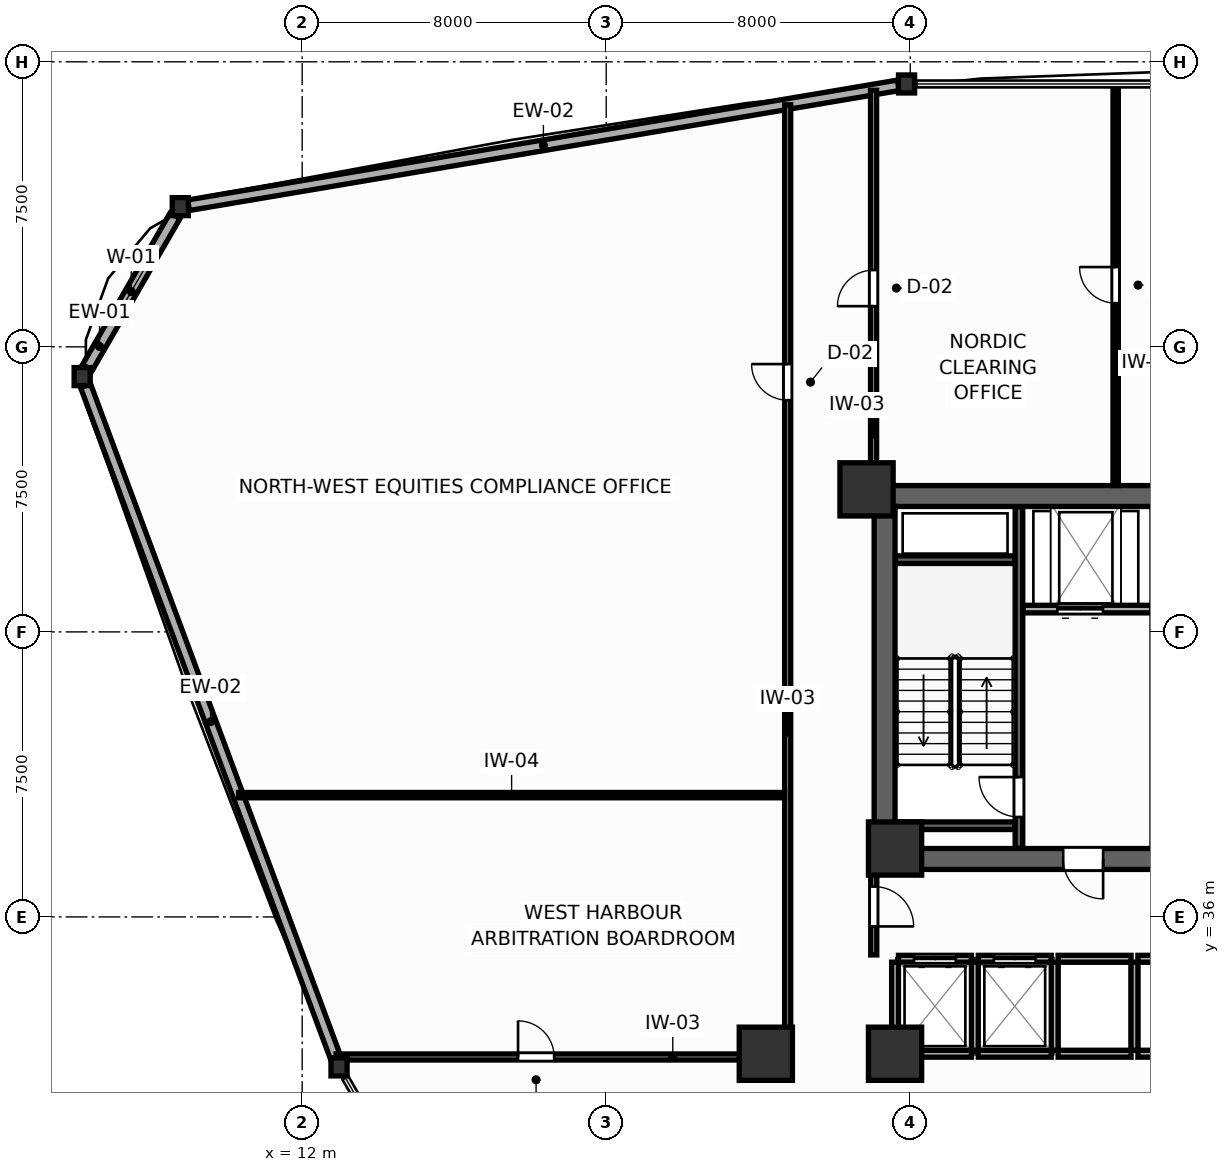
"""IFC4 building model, lengths in metres.
Left out: names, types, materials, properties, quantities, classifications, styles, units other than length and angle.
Written with IfcOpenShell. Run it as: python <this file> out.ifc"""

import sys

from ifc_helpers import new_model, si_unit, direction, frame, frame_2d, origin, origin_2d, place, context, subcontext, project, spatial, rectangle, i_section, extrude, source, transform, mapped, element, fill, save


model = new_model("IFC4")
c1 = context("Model", 3, precision=1e-05, world=origin(), true_north=direction((0.0, 1.0)))
c2 = subcontext(c1, "Body", "Model", "MODEL_VIEW")
j1 = project(units=[si_unit("LENGTHUNIT", "METRE"), si_unit("PLANEANGLEUNIT", "RADIAN")], contexts=[c1])
p1 = place(None, origin())
s1 = spatial("IfcSite", under=j1, at=p1, CompositionType="ELEMENT")
p2 = place(p1, origin())
s2 = spatial("IfcBuilding", under=s1, at=p2, CompositionType="ELEMENT")
p3 = place(p2, frame((0.0, 0.0, 27.9)))
s3 = spatial("IfcBuildingStorey", under=s2, at=p3, CompositionType="ELEMENT", Elevation=27.9)
p4 = place(p3, frame((27.05, 47.075, 0.0), z_axis=(0.0, 0.0, 1.0), x_axis=(1.0, 0.0, 0.0)))
e1 = element("IfcWall", 1, at=p4, inside=s3, PredefinedType="SHEAR", context=c2, shape_type="SweptSolid", body=[
    extrude(rectangle(XDim=17.9, YDim=0.55, at=frame_2d((8.95, 0.0))), origin(), (0.0, 0.0, 1.0), 3.9),
])
p5 = place(p3, frame((27.05, 37.525, 0.0), z_axis=(0.0, 0.0, 1.0), x_axis=(1.0, 0.0, 0.0)))
e2 = element("IfcWall", 2, at=p5, inside=s3, PredefinedType="SHEAR", context=c2, shape_type="SweptSolid", body=[
    extrude(rectangle(XDim=17.9, YDim=0.55, at=frame_2d((8.95, 0.0))), origin(), (0.0, 0.0, 1.0), 3.9),
])
p6 = place(p5, frame((4.975, 0.0, 0.0)))
e3 = element("IfcOpeningElement", 3, at=p6, cuts=e2, PredefinedType="OPENING", context=c2, shape_type="SweptSolid", body=[
    extrude(rectangle(XDim=1.05, YDim=2.1, at=frame_2d((0.525, 1.05))), frame((0.0, 0.285, 0.0), z_axis=(0.0, -1.0, 0.0), x_axis=(1.0, 0.0, 0.0)), (0.0, 0.0, 1.0), 0.57),
])
p7 = place(p5, frame((11.875, 0.0, 0.0)))
e4 = element("IfcOpeningElement", 4, at=p7, cuts=e2, PredefinedType="OPENING", context=c2, shape_type="SweptSolid", body=[
    extrude(rectangle(XDim=1.05, YDim=2.1, at=frame_2d((0.525, 1.05))), frame((0.0, 0.285, 0.0), z_axis=(0.0, -1.0, 0.0), x_axis=(1.0, 0.0, 0.0)), (0.0, 0.0, 1.0), 0.57),
])
p8 = place(p3, frame((27.325, 37.8, 0.0), z_axis=(0.0, 0.0, 1.0), x_axis=(0.0, 1.0, 0.0)))
e5 = element("IfcWall", 5, at=p8, inside=s3, PredefinedType="SHEAR", context=c2, shape_type="SweptSolid", body=[
    extrude(rectangle(XDim=9.0, YDim=0.55, at=frame_2d((4.5, 0.0))), origin(), (0.0, 0.0, 1.0), 3.9),
])
m1 = source(origin(), c2, "Body", "SweptSolid", [
    extrude(rectangle(XDim=1.4, YDim=1.4, at=origin_2d()), origin(), (0.0, 0.0, 1.0), 3.9),
])
for number, where, z_axis, x_axis in (
    (6, (26.85, 47.25, 0.0), (0.0, 0.0, 1.0), (1.0, 0.0, 0.0)),
    (7, (27.6, 37.8, 0.0), (0.0, 0.0, 1.0), (1.0, 0.0, 0.0)),
    (8, (27.6, 32.4, 0.0), (0.0, 0.0, 1.0), (1.0, 0.0, 0.0)),
    (9, (24.2, 32.4, 0.0), (0.0, 0.0, 1.0), (1.0, 0.0, 0.0)),
):
    element("IfcColumn", number, at=place(p3, frame(where, z_axis=z_axis, x_axis=x_axis)), inside=s3, PredefinedType="COLUMN", context=c2, shape_type="MappedRepresentation", body=[
        mapped(m1, transform((0.0, 0.0, 0.0), scale=1.0)),
    ])
m2 = source(origin(), c2, "Body", "SweptSolid", [
    extrude(i_section(OverallWidth=0.424, OverallDepth=0.474, WebThickness=0.045, FlangeThickness=0.072, FilletRadius=0.015, at=origin_2d()), origin(), (0.0, 0.0, 1.0), 3.9),
])
for number, where, z_axis, x_axis in (
    (10, (27.903, 57.917, 0.0), (0.0, 0.0, 1.0), (1.0, 0.0, 0.0)),
    (11, (8.793, 54.689, 0.0), (0.0, 0.0, 1.0), (1.0, 0.0, 0.0)),
    (12, (6.211, 50.217, 0.0), (0.0, 0.0, 1.0), (1.0, 0.0, 0.0)),
    (13, (12.97, 32.054, 0.0), (0.0, 0.0, 1.0), (1.0, 0.0, 0.0)),
):
    element("IfcColumn", number, at=place(p3, frame(where, z_axis=z_axis, x_axis=x_axis)), inside=s3, PredefinedType="COLUMN", context=c2, shape_type="MappedRepresentation", body=[
        mapped(m2, transform((0.0, 0.0, 0.0), scale=1.0)),
    ])
p9 = place(p3, frame((27.686, 57.88, 0.0), z_axis=(0.0, 0.0, 1.0), x_axis=(-0.98603202958, -0.166555806393, 0.0)))
e14 = element("IfcWall", 14, at=p9, inside=s3, PredefinedType="SOLIDWALL", context=c2, shape_type="SweptSolid", body=[
    extrude(rectangle(XDim=18.94, YDim=0.28, at=frame_2d((9.47, 0.0))), origin(), (0.0, 0.0, 1.0), 3.23),
])
p10 = place(p3, frame((8.654, 54.447, 0.0), z_axis=(0.0, 0.0, 1.0), x_axis=(-0.500022295776, -0.86601253093, 0.0)))
e15 = element("IfcWall", 15, at=p10, inside=s3, PredefinedType="SOLIDWALL", context=c2, shape_type="SweptSolid", body=[
    extrude(rectangle(XDim=4.605, YDim=0.3, at=frame_2d((2.302, 0.0))), origin(), (0.0, 0.0, 1.0), 3.23),
])
p11 = place(p10, frame((1.452, 0.0, 0.75)))
e16 = element("IfcOpeningElement", 16, at=p11, cuts=e15, PredefinedType="OPENING", context=c2, shape_type="SweptSolid", body=[
    extrude(rectangle(XDim=1.7, YDim=1.75, at=frame_2d((0.85, 0.875))), frame((0.0, 0.16, 0.0), z_axis=(0.0, -1.0, 0.0), x_axis=(1.0, 0.0, 0.0)), (0.0, 0.0, 1.0), 0.32),
])
p12 = place(p3, frame((6.302, 49.975, 0.0), z_axis=(0.0, 0.0, 1.0), x_axis=(0.348763587367, -0.937210734108, 0.0)))
e17 = element("IfcWall", 17, at=p12, inside=s3, PredefinedType="SOLIDWALL", context=c2, shape_type="SweptSolid", body=[
    extrude(rectangle(XDim=18.863, YDim=0.28, at=frame_2d((9.432, 0.0))), origin(), (0.0, 0.0, 1.0), 3.23),
])
p13 = place(p3, frame((30.86, 37.81, 0.0), z_axis=(0.0, 0.0, 1.0), x_axis=(0.0, 1.0, 0.0)))
e18 = element("IfcWall", 18, at=p13, inside=s3, PredefinedType="SHEAR", context=c2, shape_type="SweptSolid", body=[
    extrude(rectangle(XDim=8.98, YDim=0.2, at=frame_2d((4.49, 0.0))), origin(), (0.0, 0.0, 1.0), 3.9),
])
p14 = place(p13, frame((0.82, 0.0, 0.0)))
e19 = element("IfcOpeningElement", 19, at=p14, cuts=e18, PredefinedType="OPENING", context=c2, shape_type="SweptSolid", body=[
    extrude(rectangle(XDim=1.05, YDim=2.1, at=frame_2d((0.525, 1.05))), frame((0.0, 0.11, 0.0), z_axis=(0.0, -1.0, 0.0), x_axis=(1.0, 0.0, 0.0)), (0.0, 0.0, 1.0), 0.22),
])
for number, where, z_axis, x_axis in (
    (20, (27.61, 45.4, 0.0), (0.0, 0.0, 1.0), (1.0, 0.0, 0.0)),
    (21, (27.61, 38.4, 0.0), (0.0, 0.0, 1.0), (1.0, 0.0, 0.0)),
):
    element("IfcWall", number, at=place(p3, frame(where, z_axis=z_axis, x_axis=x_axis)), inside=s3, PredefinedType="SHEAR", context=c2, shape_type="SweptSolid", body=[
        extrude(rectangle(XDim=3.14, YDim=0.2, at=frame_2d((1.57, 0.0))), origin(), (0.0, 0.0, 1.0), 3.9),
    ])
p15 = place(p3, frame((30.97, 44.1, 0.0), z_axis=(0.0, 0.0, 1.0), x_axis=(1.0, 0.0, 0.0)))
e22 = element("IfcWall", 22, at=p15, inside=s3, PredefinedType="PARTITIONING", context=c2, shape_type="SweptSolid", body=[
    extrude(rectangle(XDim=3.38, YDim=0.2, at=frame_2d((1.69, 0.0))), origin(), (0.0, 0.0, 1.0), 3.68),
])
p16 = place(p15, frame((0.9, 0.0, 0.0)))
e23 = element("IfcOpeningElement", 23, at=p16, cuts=e22, PredefinedType="OPENING", context=c2, shape_type="SweptSolid", body=[
    extrude(rectangle(XDim=1.2, YDim=2.1, at=frame_2d((0.6, 1.05))), frame((0.0, 0.11, 0.0), z_axis=(0.0, -1.0, 0.0), x_axis=(1.0, 0.0, 0.0)), (0.0, 0.0, 1.0), 0.22),
])
p17 = place(p3, frame((27.69, 34.9, 0.0), z_axis=(0.0, 0.0, 1.0), x_axis=(1.0, 0.0, 0.0)))
e24 = element("IfcWall", 24, at=p17, inside=s3, PredefinedType="PARTITIONING", context=c2, shape_type="SweptSolid", body=[
    extrude(rectangle(XDim=1.92, YDim=0.18, at=frame_2d((0.96, 0.0))), origin(), (0.0, 0.0, 1.0), 3.68),
])
p18 = place(p17, frame((0.41, 0.0, 0.0)))
e25 = element("IfcOpeningElement", 25, at=p18, cuts=e24, PredefinedType="OPENING", context=c2, shape_type="SweptSolid", body=[
    extrude(rectangle(XDim=1.1, YDim=2.1, at=frame_2d((0.55, 1.05))), frame((0.0, 0.1, 0.0), z_axis=(0.0, -1.0, 0.0), x_axis=(1.0, 0.0, 0.0)), (0.0, 0.0, 1.0), 0.2),
])
p19 = place(p3, frame((27.69, 32.4, 0.0), z_axis=(0.0, 0.0, 1.0), x_axis=(1.0, 0.0, 0.0)))
e26 = element("IfcWall", 26, at=p19, inside=s3, PredefinedType="PARTITIONING", context=c2, shape_type="SweptSolid", body=[
    extrude(rectangle(XDim=1.92, YDim=0.18, at=frame_2d((0.96, 0.0))), origin(), (0.0, 0.0, 1.0), 3.18),
])
p20 = place(p3, frame((27.6, 32.49, 0.0), z_axis=(0.0, 0.0, 1.0), x_axis=(0.0, 1.0, 0.0)))
e27 = element("IfcWall", 27, at=p20, inside=s3, PredefinedType="PARTITIONING", context=c2, shape_type="SweptSolid", body=[
    extrude(rectangle(XDim=2.32, YDim=0.18, at=frame_2d((1.16, 0.0))), origin(), (0.0, 0.0, 1.0), 3.68),
])
p21 = place(p3, frame((29.79, 34.9, 0.0), z_axis=(0.0, 0.0, 1.0), x_axis=(1.0, 0.0, 0.0)))
e28 = element("IfcWall", 28, at=p21, inside=s3, PredefinedType="PARTITIONING", context=c2, shape_type="SweptSolid", body=[
    extrude(rectangle(XDim=1.92, YDim=0.18, at=frame_2d((0.96, 0.0))), origin(), (0.0, 0.0, 1.0), 3.68),
])
p22 = place(p21, frame((0.41, 0.0, 0.0)))
e29 = element("IfcOpeningElement", 29, at=p22, cuts=e28, PredefinedType="OPENING", context=c2, shape_type="SweptSolid", body=[
    extrude(rectangle(XDim=1.1, YDim=2.1, at=frame_2d((0.55, 1.05))), frame((0.0, 0.1, 0.0), z_axis=(0.0, -1.0, 0.0), x_axis=(1.0, 0.0, 0.0)), (0.0, 0.0, 1.0), 0.2),
])
p23 = place(p3, frame((29.79, 32.4, 0.0), z_axis=(0.0, 0.0, 1.0), x_axis=(1.0, 0.0, 0.0)))
e30 = element("IfcWall", 30, at=p23, inside=s3, PredefinedType="PARTITIONING", context=c2, shape_type="SweptSolid", body=[
    extrude(rectangle(XDim=1.92, YDim=0.18, at=frame_2d((0.96, 0.0))), origin(), (0.0, 0.0, 1.0), 3.18),
])
p24 = place(p3, frame((29.7, 32.49, 0.0), z_axis=(0.0, 0.0, 1.0), x_axis=(0.0, 1.0, 0.0)))
e31 = element("IfcWall", 31, at=p24, inside=s3, PredefinedType="PARTITIONING", context=c2, shape_type="SweptSolid", body=[
    extrude(rectangle(XDim=2.32, YDim=0.18, at=frame_2d((1.16, 0.0))), origin(), (0.0, 0.0, 1.0), 3.68),
])
p25 = place(p3, frame((31.89, 34.9, 0.0), z_axis=(0.0, 0.0, 1.0), x_axis=(1.0, 0.0, 0.0)))
e32 = element("IfcWall", 32, at=p25, inside=s3, PredefinedType="PARTITIONING", context=c2, shape_type="SweptSolid", body=[
    extrude(rectangle(XDim=1.92, YDim=0.18, at=frame_2d((0.96, 0.0))), origin(), (0.0, 0.0, 1.0), 3.68),
])
p26 = place(p3, frame((31.89, 32.4, 0.0), z_axis=(0.0, 0.0, 1.0), x_axis=(1.0, 0.0, 0.0)))
e33 = element("IfcWall", 33, at=p26, inside=s3, PredefinedType="PARTITIONING", context=c2, shape_type="SweptSolid", body=[
    extrude(rectangle(XDim=1.92, YDim=0.18, at=frame_2d((0.96, 0.0))), origin(), (0.0, 0.0, 1.0), 3.18),
])
p27 = place(p3, frame((31.8, 32.49, 0.0), z_axis=(0.0, 0.0, 1.0), x_axis=(0.0, 1.0, 0.0)))
e34 = element("IfcWall", 34, at=p27, inside=s3, PredefinedType="PARTITIONING", context=c2, shape_type="SweptSolid", body=[
    extrude(rectangle(XDim=2.32, YDim=0.18, at=frame_2d((1.16, 0.0))), origin(), (0.0, 0.0, 1.0), 3.68),
])
p28 = place(p3, frame((33.99, 34.9, 0.0), z_axis=(0.0, 0.0, 1.0), x_axis=(1.0, 0.0, 0.0)))
e35 = element("IfcWall", 35, at=p28, inside=s3, PredefinedType="PARTITIONING", context=c2, shape_type="SweptSolid", body=[
    extrude(rectangle(XDim=1.92, YDim=0.18, at=frame_2d((0.96, 0.0))), origin(), (0.0, 0.0, 1.0), 3.68),
])
p29 = place(p3, frame((33.99, 32.4, 0.0), z_axis=(0.0, 0.0, 1.0), x_axis=(1.0, 0.0, 0.0)))
e36 = element("IfcWall", 36, at=p29, inside=s3, PredefinedType="PARTITIONING", context=c2, shape_type="SweptSolid", body=[
    extrude(rectangle(XDim=1.92, YDim=0.18, at=frame_2d((0.96, 0.0))), origin(), (0.0, 0.0, 1.0), 3.18),
])
p30 = place(p3, frame((33.9, 32.49, 0.0), z_axis=(0.0, 0.0, 1.0), x_axis=(0.0, 1.0, 0.0)))
e37 = element("IfcWall", 37, at=p30, inside=s3, PredefinedType="PARTITIONING", context=c2, shape_type="SweptSolid", body=[
    extrude(rectangle(XDim=2.32, YDim=0.18, at=frame_2d((1.16, 0.0))), origin(), (0.0, 0.0, 1.0), 3.68),
])
p31 = place(p3, frame((27.04, 35.0, 0.0), z_axis=(0.0, 0.0, 1.0), x_axis=(0.0, 1.0, 0.0)))
e38 = element("IfcWall", 38, at=p31, inside=s3, PredefinedType="PARTITIONING", context=c2, shape_type="SweptSolid", body=[
    extrude(rectangle(XDim=2.65, YDim=0.16, at=frame_2d((1.325, 0.0))), origin(), (0.0, 0.0, 1.0), 3.68),
])
p32 = place(p31, frame((0.75, 0.0, 0.0)))
e39 = element("IfcOpeningElement", 39, at=p32, cuts=e38, PredefinedType="OPENING", context=c2, shape_type="SweptSolid", body=[
    extrude(rectangle(XDim=1.05, YDim=2.1, at=frame_2d((0.525, 1.05))), frame((0.0, 0.09, 0.0), z_axis=(0.0, -1.0, 0.0), x_axis=(1.0, 0.0, 0.0)), (0.0, 0.0, 1.0), 0.18),
])
p33 = place(p3, frame((24.775, 32.31, 0.0), z_axis=(0.0, 0.0, 1.0), x_axis=(0.0, 1.0, 0.0)))
e40 = element("IfcWall", 40, at=p33, inside=s3, PredefinedType="PARTITIONING", context=c2, shape_type="SweptSolid", body=[
    extrude(rectangle(XDim=25.059, YDim=0.16, at=frame_2d((12.529, 0.0))), origin(), (0.0, 0.0, 1.0), 3.68),
])
p34 = place(p33, frame((17.287, 0.0, 0.0)))
e41 = element("IfcOpeningElement", 41, at=p34, cuts=e40, PredefinedType="OPENING", context=c2, shape_type="SweptSolid", body=[
    extrude(rectangle(XDim=0.95, YDim=2.05, at=frame_2d((0.475, 1.025))), frame((0.0, 0.09, 0.0), z_axis=(0.0, -1.0, 0.0), x_axis=(1.0, 0.0, 0.0)), (0.0, 0.0, 1.0), 0.18),
])
p35 = place(p3, frame((12.893, 32.315, 0.0), z_axis=(0.0, 0.0, 1.0), x_axis=(1.0, 0.0, 0.0)))
e42 = element("IfcWall", 42, at=p35, inside=s3, PredefinedType="PARTITIONING", context=c2, shape_type="SweptSolid", body=[
    extrude(rectangle(XDim=11.8, YDim=0.16, at=frame_2d((5.9, 0.0))), origin(), (0.0, 0.0, 1.0), 3.18),
])
p36 = place(p35, frame((4.787, 0.0, 0.0)))
e43 = element("IfcOpeningElement", 43, at=p36, cuts=e42, PredefinedType="OPENING", context=c2, shape_type="SweptSolid", body=[
    extrude(rectangle(XDim=0.95, YDim=2.05, at=frame_2d((0.475, 1.025))), frame((0.0, 0.09, 0.0), z_axis=(0.0, -1.0, 0.0), x_axis=(1.0, 0.0, 0.0)), (0.0, 0.0, 1.0), 0.18),
])
p37 = place(p3, frame((27.035, 47.34, 0.0), z_axis=(0.0, 0.0, 1.0), x_axis=(0.0, 1.0, 0.0)))
e44 = element("IfcWall", 44, at=p37, inside=s3, PredefinedType="PARTITIONING", context=c2, shape_type="SweptSolid", body=[
    extrude(rectangle(XDim=10.41, YDim=0.16, at=frame_2d((5.205, 0.0))), origin(), (0.0, 0.0, 1.0), 3.18),
])
p38 = place(p37, frame((4.73, 0.0, 0.0)))
e45 = element("IfcOpeningElement", 45, at=p38, cuts=e44, PredefinedType="OPENING", context=c2, shape_type="SweptSolid", body=[
    extrude(rectangle(XDim=0.95, YDim=2.05, at=frame_2d((0.475, 1.025))), frame((0.0, 0.09, 0.0), z_axis=(0.0, -1.0, 0.0), x_axis=(1.0, 0.0, 0.0)), (0.0, 0.0, 1.0), 0.18),
])
p39 = place(p3, frame((10.329, 39.205, 0.0), z_axis=(0.0, 0.0, 1.0), x_axis=(1.0, 0.0, 0.0)))
e46 = element("IfcWall", 46, at=p39, inside=s3, PredefinedType="PARTITIONING", context=c2, shape_type="SweptSolid", body=[
    extrude(rectangle(XDim=14.364, YDim=0.14, at=frame_2d((7.182, 0.0))), origin(), (0.0, 0.0, 1.0), 3.68),
])
p40 = place(p3, frame((33.405, 47.352, 0.0), z_axis=(0.0, 0.0, 1.0), x_axis=(0.0, 1.0, 0.0)))
e47 = element("IfcWall", 47, at=p40, inside=s3, PredefinedType="PARTITIONING", context=c2, shape_type="SweptSolid", body=[
    extrude(rectangle(XDim=10.545, YDim=0.14, at=frame_2d((5.272, 0.0))), origin(), (0.0, 0.0, 1.0), 3.68),
])
p41 = place(p40, frame((4.798, 0.0, 0.0)))
e48 = element("IfcOpeningElement", 48, at=p41, cuts=e47, PredefinedType="OPENING", context=c2, shape_type="SweptSolid", body=[
    extrude(rectangle(XDim=0.95, YDim=2.05, at=frame_2d((0.475, 1.025))), frame((0.0, 0.08, 0.0), z_axis=(0.0, -1.0, 0.0), x_axis=(1.0, 0.0, 0.0)), (0.0, 0.0, 1.0), 0.16),
])
p42 = place(p11, origin())
e49 = element("IfcWindow", 49, at=p42, inside=s3, PartitioningType="SINGLE_PANEL", PredefinedType="WINDOW", context=c2, shape_type="SweptSolid", body=[
    extrude(rectangle(XDim=1.7, YDim=1.75, at=frame_2d((0.85, 0.875))), frame((0.0, 0.03, 0.0), z_axis=(0.0, -1.0, 0.0), x_axis=(1.0, 0.0, 0.0)), (0.0, 0.0, 1.0), 0.06),
])
fill(e16, e49)
p43 = place(p14, origin())
e50 = element("IfcDoor", 50, at=p43, inside=s3, OperationType="SINGLE_SWING_RIGHT", PredefinedType="DOOR", context=c2, shape_type="SweptSolid", body=[
    extrude(rectangle(XDim=1.05, YDim=2.1, at=frame_2d((0.525, 1.05))), frame((0.0, 0.025, 0.0), z_axis=(0.0, -1.0, 0.0), x_axis=(1.0, 0.0, 0.0)), (0.0, 0.0, 1.0), 0.05),
])
fill(e19, e50)
p44 = place(p16, origin())
e51 = element("IfcDoor", 51, at=p44, inside=s3, OperationType="DOUBLE_DOOR_SLIDING", PredefinedType="DOOR", context=c2, shape_type="SweptSolid", body=[
    extrude(rectangle(XDim=1.2, YDim=2.1, at=frame_2d((0.6, 1.05))), frame((0.0, 0.025, 0.0), z_axis=(0.0, -1.0, 0.0), x_axis=(1.0, 0.0, 0.0)), (0.0, 0.0, 1.0), 0.05),
])
fill(e23, e51)
p45 = place(p18, origin())
e52 = element("IfcDoor", 52, at=p45, inside=s3, OperationType="DOUBLE_DOOR_SLIDING", PredefinedType="DOOR", context=c2, shape_type="SweptSolid", body=[
    extrude(rectangle(XDim=1.1, YDim=2.1, at=frame_2d((0.55, 1.05))), frame((0.0, 0.025, 0.0), z_axis=(0.0, -1.0, 0.0), x_axis=(1.0, 0.0, 0.0)), (0.0, 0.0, 1.0), 0.05),
])
fill(e25, e52)
p46 = place(p22, origin())
e53 = element("IfcDoor", 53, at=p46, inside=s3, OperationType="DOUBLE_DOOR_SLIDING", PredefinedType="DOOR", context=c2, shape_type="SweptSolid", body=[
    extrude(rectangle(XDim=1.1, YDim=2.1, at=frame_2d((0.55, 1.05))), frame((0.0, 0.025, 0.0), z_axis=(0.0, -1.0, 0.0), x_axis=(1.0, 0.0, 0.0)), (0.0, 0.0, 1.0), 0.05),
])
fill(e29, e53)
p47 = place(p32, frame((1.05, 0.0, 0.0), z_axis=(0.0, 0.0, 1.0), x_axis=(-1.0, 0.0, 0.0)))
e54 = element("IfcDoor", 54, at=p47, inside=s3, OperationType="SINGLE_SWING_RIGHT", PredefinedType="DOOR", context=c2, shape_type="SweptSolid", body=[
    extrude(rectangle(XDim=1.05, YDim=2.1, at=frame_2d((0.525, 1.05))), frame((0.0, 0.025, 0.0), z_axis=(0.0, -1.0, 0.0), x_axis=(1.0, 0.0, 0.0)), (0.0, 0.0, 1.0), 0.05),
])
fill(e39, e54)
p48 = place(p34, origin())
e55 = element("IfcDoor", 55, at=p48, inside=s3, OperationType="SINGLE_SWING_RIGHT", PredefinedType="DOOR", context=c2, shape_type="SweptSolid", body=[
    extrude(rectangle(XDim=0.95, YDim=2.05, at=frame_2d((0.475, 1.025))), frame((0.0, 0.025, 0.0), z_axis=(0.0, -1.0, 0.0), x_axis=(1.0, 0.0, 0.0)), (0.0, 0.0, 1.0), 0.05),
])
fill(e41, e55)
p49 = place(p36, origin())
e56 = element("IfcDoor", 56, at=p49, inside=s3, OperationType="SINGLE_SWING_LEFT", PredefinedType="DOOR", context=c2, shape_type="SweptSolid", body=[
    extrude(rectangle(XDim=0.95, YDim=2.05, at=frame_2d((0.475, 1.025))), frame((0.0, 0.025, 0.0), z_axis=(0.0, -1.0, 0.0), x_axis=(1.0, 0.0, 0.0)), (0.0, 0.0, 1.0), 0.05),
])
fill(e43, e56)
p50 = place(p38, origin())
e57 = element("IfcDoor", 57, at=p50, inside=s3, OperationType="SINGLE_SWING_LEFT", PredefinedType="DOOR", context=c2, shape_type="SweptSolid", body=[
    extrude(rectangle(XDim=0.95, YDim=2.05, at=frame_2d((0.475, 1.025))), frame((0.0, 0.025, 0.0), z_axis=(0.0, -1.0, 0.0), x_axis=(1.0, 0.0, 0.0)), (0.0, 0.0, 1.0), 0.05),
])
fill(e45, e57)
p51 = place(p41, origin())
e58 = element("IfcDoor", 58, at=p51, inside=s3, OperationType="SINGLE_SWING_RIGHT", PredefinedType="DOOR", context=c2, shape_type="SweptSolid", body=[
    extrude(rectangle(XDim=0.95, YDim=2.05, at=frame_2d((0.475, 1.025))), frame((0.0, 0.025, 0.0), z_axis=(0.0, -1.0, 0.0), x_axis=(1.0, 0.0, 0.0)), (0.0, 0.0, 1.0), 0.05),
])
fill(e48, e58)
p52 = place(p6, frame((1.05, 0.0, 0.0), z_axis=(0.0, 0.0, 1.0), x_axis=(-1.0, 0.0, 0.0)))
e59 = element("IfcDoor", 59, at=p52, inside=s3, OperationType="SINGLE_SWING_LEFT", PredefinedType="DOOR", context=c2, shape_type="SweptSolid", body=[
    extrude(rectangle(XDim=1.05, YDim=2.1, at=frame_2d((0.525, 1.05))), frame((0.0, 0.025, 0.0), z_axis=(0.0, -1.0, 0.0), x_axis=(1.0, 0.0, 0.0)), (0.0, 0.0, 1.0), 0.05),
])
fill(e3, e59)
save(model, sys.argv[1])
